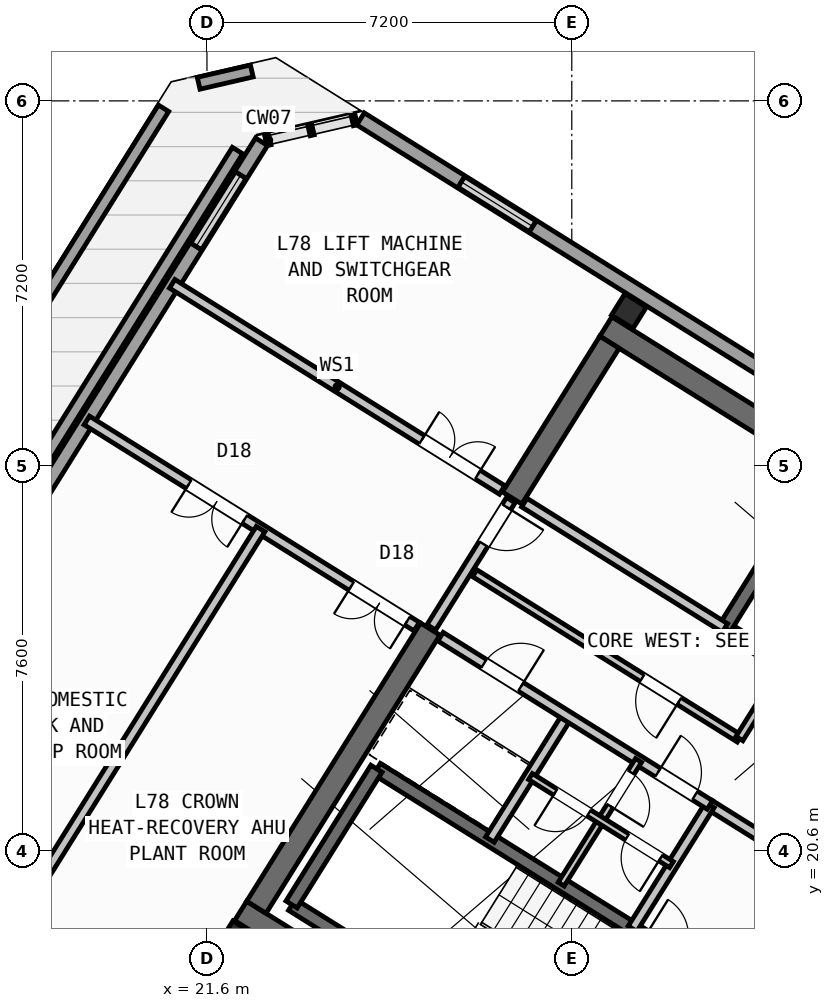
"""IFC4 building model, lengths in metres.
Left out: names, types, materials, properties, quantities, classifications, styles, units other than length and angle.
Written with IfcOpenShell. Run it as: python <this file> out.ifc"""

import sys

from ifc_helpers import new_model, si_unit, direction, frame, frame_2d, origin, origin_2d, place, context, subcontext, project, spatial, rectangle, hollow_rectangle, extrude, source, transform, mapped, element, fill, save


model = new_model("IFC4")
c1 = context("Model", 3, precision=1e-05, world=origin(), true_north=direction((0.0, 1.0)))
c2 = subcontext(c1, "Body", "Model", "MODEL_VIEW")
j1 = project(units=[si_unit("LENGTHUNIT", "METRE"), si_unit("PLANEANGLEUNIT", "RADIAN")], contexts=[c1])
p1 = place(None, origin())
s1 = spatial("IfcSite", under=j1, at=p1, CompositionType="ELEMENT")
p2 = place(p1, origin())
s2 = spatial("IfcBuilding", under=s1, at=p2, CompositionType="ELEMENT")
p3 = place(p2, frame((0.0, 0.0, 306.0)))
s3 = spatial("IfcBuildingStorey", under=s2, at=p3, CompositionType="ELEMENT", Elevation=306.0)
p4 = place(p3, frame((40.531, 24.036, 0.0), z_axis=(0.0, 0.0, 1.0), x_axis=(-0.848048787466, 0.529918157905, 0.0)))
e1 = element("IfcWall", 1, at=p4, inside=s3, PredefinedType="SHEAR", context=c2, shape_type="SweptSolid", body=[
    extrude(rectangle(XDim=13.04, YDim=0.45, at=frame_2d((6.52, 0.0))), origin(), (0.0, 0.0, 1.0), 3.32),
])
p5 = place(p3, frame((33.324, 12.503, 0.0), z_axis=(0.0, 0.0, 1.0), x_axis=(-0.848043529849, 0.529926571782, 0.0)))
e2 = element("IfcWall", 2, at=p5, inside=s3, PredefinedType="SHEAR", context=c2, shape_type="SweptSolid", body=[
    extrude(rectangle(XDim=13.04, YDim=0.45, at=frame_2d((6.52, 0.0))), origin(), (0.0, 0.0, 1.0), 3.32),
])
p6 = place(p3, frame((29.544, 30.636, 0.0), z_axis=(0.0, 0.0, 1.0), x_axis=(-0.529902075036, -0.848058836916, 0.0)))
e3 = element("IfcWall", 3, at=p6, inside=s3, PredefinedType="SHEAR", context=c2, shape_type="SweptSolid", body=[
    extrude(rectangle(XDim=3.625, YDim=0.45, at=frame_2d((1.812, 0.0))), origin(), (0.0, 0.0, 1.0), 3.32),
])
p7 = place(p3, frame((26.007, 24.976, 0.0), z_axis=(0.0, 0.0, 1.0), x_axis=(-0.529931155655, -0.848040665456, 0.0)))
e4 = element("IfcWall", 4, at=p7, inside=s3, PredefinedType="SHEAR", context=c2, shape_type="SweptSolid", body=[
    extrude(rectangle(XDim=6.475, YDim=0.45, at=frame_2d((3.238, 0.0))), origin(), (0.0, 0.0, 1.0), 3.32),
])
m1 = source(origin(), c2, "Body", "SweptSolid", [
    extrude(hollow_rectangle(XDim=0.5, YDim=0.5, WallThickness=0.025, at=origin_2d()), origin(), (0.0, 0.0, 1.0), 3.6),
])
for number, where, z_axis, x_axis in (
    (5, (29.928, 31.251, 0.0), (0.0, 0.0, 1.0), (-0.848, 0.53, 0.0)),
    (6, (22.191, 18.87, 0.0), (0.0, 0.0, 1.0), (-0.848, 0.53, 0.0)),
):
    element("IfcColumn", number, at=place(p3, frame(where, z_axis=z_axis, x_axis=x_axis)), inside=s3, PredefinedType="COLUMN", context=c2, shape_type="MappedRepresentation", body=[
        mapped(m1, transform((0.0, 0.0, 0.0), scale=1.0)),
    ])
p8 = place(p3, frame((12.129, 21.469, 0.0), z_axis=(0.0, 0.0, 1.0), x_axis=(0.529920637882, 0.848047237804, 0.0)))
e7 = element("IfcWall", 7, at=p8, inside=s3, PredefinedType="PARAPET", context=c2, shape_type="SweptSolid", body=[
    extrude(rectangle(XDim=16.256, YDim=0.24, at=frame_2d((8.128, 0.0))), origin(), (0.0, 0.0, 1.0), 1.15),
])
p9 = place(p3, frame((21.436, 35.748, 0.0), z_axis=(0.0, 0.0, 1.0), x_axis=(0.974395015602, 0.224842953123, 0.0)))
e8 = element("IfcWall", 8, at=p9, inside=s3, PredefinedType="PARAPET", context=c2, shape_type="SweptSolid", body=[
    extrude(rectangle(XDim=1.077, YDim=0.24, at=frame_2d((0.539, 0.0))), origin(), (0.0, 0.0, 1.0), 1.15),
])
p10 = place(p3, frame((22.203, 34.42, 0.0), z_axis=(0.0, 0.0, 1.0), x_axis=(-0.529922606747, -0.848046007513, 0.0)))
e9 = element("IfcWall", 9, at=p10, inside=s3, PredefinedType="PARAPET", context=c2, shape_type="SweptSolid", body=[
    extrude(rectangle(XDim=15.238, YDim=0.24, at=frame_2d((7.619, 0.0))), origin(), (0.0, 0.0, 1.0), 1.15),
])
p11 = place(p3, frame((30.731, 8.982, 0.0), z_axis=(0.0, 0.0, 1.0), x_axis=(-0.848046707212, 0.529921487002, 0.0)))
e10 = element("IfcWall", 10, at=p11, inside=s3, PredefinedType="STANDARD", context=c2, shape_type="SweptSolid", body=[
    extrude(rectangle(XDim=18.984, YDim=0.28, at=frame_2d((9.492, 0.0))), origin(), (0.0, 0.0, 1.0), 3.32),
])
p12 = place(p11, frame((7.283, 0.0, 0.85)))
e11 = element("IfcOpeningElement", 11, at=p12, cuts=e10, PredefinedType="OPENING", context=c2, shape_type="SweptSolid", body=[
    extrude(rectangle(XDim=1.7, YDim=1.6, at=frame_2d((0.85, 0.8))), frame((0.0, 0.15, 0.0), z_axis=(0.0, -1.0, 0.0), x_axis=(1.0, 0.0, 0.0)), (0.0, 0.0, 1.0), 0.3),
])
p13 = place(p3, frame((14.18, 20.996, 0.0), z_axis=(0.0, 0.0, 1.0), x_axis=(0.529922292894, 0.848046203632, 0.0)))
e12 = element("IfcWall", 12, at=p13, inside=s3, PredefinedType="STANDARD", context=c2, shape_type="SweptSolid", body=[
    extrude(rectangle(XDim=16.034, YDim=0.28, at=frame_2d((8.017, 0.0))), origin(), (0.0, 0.0, 1.0), 3.32),
])
p14 = place(p13, frame((3.871, 0.0, 0.85)))
e13 = element("IfcOpeningElement", 13, at=p14, cuts=e12, PredefinedType="OPENING", context=c2, shape_type="SweptSolid", body=[
    extrude(rectangle(XDim=1.7, YDim=1.6, at=frame_2d((0.85, 0.8))), frame((0.0, 0.15, 0.0), z_axis=(0.0, -1.0, 0.0), x_axis=(1.0, 0.0, 0.0)), (0.0, 0.0, 1.0), 0.3),
])
p15 = place(p13, frame((13.578, 0.0, 0.85)))
e14 = element("IfcOpeningElement", 14, at=p15, cuts=e12, PredefinedType="OPENING", context=c2, shape_type="SweptSolid", body=[
    extrude(rectangle(XDim=1.7, YDim=1.6, at=frame_2d((0.85, 0.8))), frame((0.0, 0.15, 0.0), z_axis=(0.0, -1.0, 0.0), x_axis=(1.0, 0.0, 0.0)), (0.0, 0.0, 1.0), 0.3),
])
p16 = place(p3, frame((24.631, 35.045, 0.0), z_axis=(0.0, 0.0, 1.0), x_axis=(0.848046707212, -0.529921487002, 0.0)))
e15 = element("IfcWall", 15, at=p16, inside=s3, PredefinedType="STANDARD", context=c2, shape_type="SweptSolid", body=[
    extrude(rectangle(XDim=18.984, YDim=0.28, at=frame_2d((9.492, 0.0))), origin(), (0.0, 0.0, 1.0), 3.32),
])
p17 = place(p16, frame((2.326, 0.0, 0.85)))
e16 = element("IfcOpeningElement", 16, at=p17, cuts=e15, PredefinedType="OPENING", context=c2, shape_type="SweptSolid", body=[
    extrude(rectangle(XDim=1.7, YDim=1.6, at=frame_2d((0.85, 0.8))), frame((0.0, 0.15, 0.0), z_axis=(0.0, -1.0, 0.0), x_axis=(1.0, 0.0, 0.0)), (0.0, 0.0, 1.0), 0.3),
])
p18 = place(p16, frame((11.968, 0.0, 0.85)))
e17 = element("IfcOpeningElement", 17, at=p18, cuts=e15, PredefinedType="OPENING", context=c2, shape_type="SweptSolid", body=[
    extrude(rectangle(XDim=1.7, YDim=1.6, at=frame_2d((0.85, 0.8))), frame((0.0, 0.15, 0.0), z_axis=(0.0, -1.0, 0.0), x_axis=(1.0, 0.0, 0.0)), (0.0, 0.0, 1.0), 0.3),
])
p19 = place(p3, frame((29.605, 15.581, 0.0), z_axis=(0.0, 0.0, 1.0), x_axis=(-0.848036911448, 0.529937163087, 0.0)))
e18 = element("IfcWall", 18, at=p19, inside=s3, PredefinedType="SHEAR", context=c2, shape_type="SweptSolid", body=[
    extrude(rectangle(XDim=7.46, YDim=0.26, at=frame_2d((3.73, 0.0))), origin(), (0.0, 0.0, 1.0), 3.32),
])
p20 = place(p3, frame((31.28, 18.261, 0.0), z_axis=(0.0, 0.0, 1.0), x_axis=(-0.848051618787, 0.529913626805, 0.0)))
e19 = element("IfcWall", 19, at=p20, inside=s3, PredefinedType="SHEAR", context=c2, shape_type="SweptSolid", body=[
    extrude(rectangle(XDim=7.46, YDim=0.26, at=frame_2d((3.73, 0.0))), origin(), (0.0, 0.0, 1.0), 3.32),
])
p21 = place(p20, frame((0.36, 0.0, 0.0)))
e20 = element("IfcOpeningElement", 20, at=p21, cuts=e19, PredefinedType="OPENING", context=c2, shape_type="SweptSolid", body=[
    extrude(rectangle(XDim=0.86, YDim=2.05, at=frame_2d((0.43, 1.025))), frame((0.0, 0.14, 0.0), z_axis=(0.0, -1.0, 0.0), x_axis=(1.0, 0.0, 0.0)), (0.0, 0.0, 1.0), 0.28),
])
p22 = place(p3, frame((24.945, 22.22, 0.0), z_axis=(0.0, 0.0, 1.0), x_axis=(-0.529908658664, -0.84805472316, 0.0)))
e21 = element("IfcWall", 21, at=p22, inside=s3, PredefinedType="SHEAR", context=c2, shape_type="SweptSolid", body=[
    extrude(rectangle(XDim=3.16, YDim=0.26, at=frame_2d((1.58, 0.0))), origin(), (0.0, 0.0, 1.0), 3.32),
])
p23 = place(p3, frame((38.046, 21.108, 0.0), z_axis=(0.0, 0.0, 1.0), x_axis=(-0.848054434086, 0.529909121291, 0.0)))
e22 = element("IfcWall", 22, at=p23, inside=s3, PredefinedType="SHEAR", context=c2, shape_type="SweptSolid", body=[
    extrude(rectangle(XDim=7.33, YDim=0.26, at=frame_2d((3.665, 0.0))), origin(), (0.0, 0.0, 1.0), 3.32),
])
p24 = place(p23, frame((0.22, 0.0, 0.0)))
e23 = element("IfcOpeningElement", 23, at=p24, cuts=e22, PredefinedType="OPENING", context=c2, shape_type="SweptSolid", body=[
    extrude(rectangle(XDim=1.1, YDim=2.1, at=frame_2d((0.55, 1.05))), frame((0.0, 0.14, 0.0), z_axis=(0.0, -1.0, 0.0), x_axis=(1.0, 0.0, 0.0)), (0.0, 0.0, 1.0), 0.28),
])
p25 = place(p3, frame((33.496, 27.677, 0.0), z_axis=(0.0, 0.0, 1.0), x_axis=(-0.529908658664, -0.84805472316, 0.0)))
e24 = element("IfcWall", 24, at=p25, inside=s3, PredefinedType="SHEAR", context=c2, shape_type="SweptSolid", body=[
    extrude(rectangle(XDim=3.16, YDim=0.26, at=frame_2d((1.58, 0.0))), origin(), (0.0, 0.0, 1.0), 3.32),
])
p26 = place(p3, frame((36.459, 18.421, 0.0), z_axis=(0.0, 0.0, 1.0), x_axis=(-0.848059591691, 0.529900867089, 0.0)))
e25 = element("IfcWall", 25, at=p26, inside=s3, PredefinedType="STANDARD", context=c2, shape_type="SweptSolid", body=[
    extrude(rectangle(XDim=5.818, YDim=0.2, at=frame_2d((2.909, 0.0))), origin(), (0.0, 0.0, 1.0), 3.31),
])
p27 = place(p26, frame((2.598, 0.0, 0.0)))
e26 = element("IfcOpeningElement", 26, at=p27, cuts=e25, PredefinedType="OPENING", context=c2, shape_type="SweptSolid", body=[
    extrude(rectangle(XDim=1.15, YDim=2.1, at=frame_2d((0.575, 1.05))), frame((0.0, 0.11, 0.0), z_axis=(0.0, -1.0, 0.0), x_axis=(1.0, 0.0, 0.0)), (0.0, 0.0, 1.0), 0.22),
])
p28 = place(p3, frame((31.822, 24.998, 0.0), z_axis=(0.0, 0.0, 1.0), x_axis=(-0.848054125777, 0.529909614701, 0.0)))
e27 = element("IfcWall", 27, at=p28, inside=s3, PredefinedType="STANDARD", context=c2, shape_type="SweptSolid", body=[
    extrude(rectangle(XDim=4.668, YDim=0.2, at=frame_2d((2.334, 0.0))), origin(), (0.0, 0.0, 1.0), 3.31),
])
p29 = place(p3, frame((32.108, 22.814, 0.0), z_axis=(0.0, 0.0, 1.0), x_axis=(-0.848047283855, 0.529920564185, 0.0)))
e28 = element("IfcWall", 28, at=p29, inside=s3, PredefinedType="PARTITIONING", context=c2, shape_type="SweptSolid", body=[
    extrude(rectangle(XDim=6.16, YDim=0.16, at=frame_2d((3.08, 0.0))), origin(), (0.0, 0.0, 1.0), 3.31),
])
p30 = place(p29, frame((1.4, 0.0, 0.0)))
e29 = element("IfcOpeningElement", 29, at=p30, cuts=e28, PredefinedType="OPENING", context=c2, shape_type="SweptSolid", body=[
    extrude(rectangle(XDim=0.86, YDim=2.05, at=frame_2d((0.43, 1.025))), frame((0.0, 0.09, 0.0), z_axis=(0.0, -1.0, 0.0), x_axis=(1.0, 0.0, 0.0)), (0.0, 0.0, 1.0), 0.18),
])
p31 = place(p3, frame((32.982, 24.213, 0.0), z_axis=(0.0, 0.0, 1.0), x_axis=(-0.529839334948, -0.84809803628, 0.0)))
e30 = element("IfcWall", 30, at=p31, inside=s3, PredefinedType="PARTITIONING", context=c2, shape_type="SweptSolid", body=[
    extrude(rectangle(XDim=1.65, YDim=0.16, at=frame_2d((0.825, 0.0))), origin(), (0.0, 0.0, 1.0), 3.31),
])
for number, where, z_axis, x_axis in (
    (31, (31.525, 21.504, 0.0), (0.0, 0.0, 1.0), (-0.53, -0.848, 0.0)),
    (32, (28.71, 23.263, 0.0), (0.0, 0.0, 1.0), (-0.53, -0.848, 0.0)),
):
    element("IfcWall", number, at=place(p3, frame(where, z_axis=z_axis, x_axis=x_axis)), inside=s3, PredefinedType="STANDARD", context=c2, shape_type="SweptSolid", body=[
        extrude(rectangle(XDim=2.88, YDim=0.2, at=frame_2d((1.44, 0.0))), origin(), (0.0, 0.0, 1.0), 3.31),
    ])
p32 = place(p3, frame((31.525, 21.504, 0.0), z_axis=(0.0, 0.0, 1.0), x_axis=(-0.848042066329, 0.529928913853, 0.0)))
e33 = element("IfcWall", 33, at=p32, inside=s3, PredefinedType="STANDARD", context=c2, shape_type="SweptSolid", body=[
    extrude(rectangle(XDim=6.268, YDim=0.2, at=frame_2d((3.134, 0.0))), origin(), (0.0, 0.0, 1.0), 3.31),
])
p33 = place(p32, frame((4.4, 0.0, 0.0)))
e34 = element("IfcOpeningElement", 34, at=p33, cuts=e33, PredefinedType="OPENING", context=c2, shape_type="SweptSolid", body=[
    extrude(rectangle(XDim=0.86, YDim=2.05, at=frame_2d((0.43, 1.025))), frame((0.0, 0.11, 0.0), z_axis=(0.0, -1.0, 0.0), x_axis=(1.0, 0.0, 0.0)), (0.0, 0.0, 1.0), 0.22),
])
p34 = place(p32, frame((0.35, 0.0, 0.0)))
e35 = element("IfcOpeningElement", 35, at=p34, cuts=e33, PredefinedType="OPENING", context=c2, shape_type="SweptSolid", body=[
    extrude(rectangle(XDim=0.86, YDim=2.05, at=frame_2d((0.43, 1.025))), frame((0.0, 0.11, 0.0), z_axis=(0.0, -1.0, 0.0), x_axis=(1.0, 0.0, 0.0)), (0.0, 0.0, 1.0), 0.22),
])
p35 = place(p3, frame((30.117, 22.384, 0.0), z_axis=(0.0, 0.0, 1.0), x_axis=(-0.529951914384, -0.848027693204, 0.0)))
e36 = element("IfcWall", 36, at=p35, inside=s3, PredefinedType="PLUMBINGWALL", context=c2, shape_type="SweptSolid", body=[
    extrude(rectangle(XDim=1.4, YDim=0.14, at=frame_2d((0.7, 0.0))), origin(), (0.0, 0.0, 1.0), 3.31),
])
p36 = place(p35, frame((0.28, 0.0, 0.0)))
e37 = element("IfcOpeningElement", 37, at=p36, cuts=e36, PredefinedType="OPENING", context=c2, shape_type="SweptSolid", body=[
    extrude(rectangle(XDim=0.78, YDim=2.05, at=frame_2d((0.39, 1.025))), frame((0.0, 0.08, 0.0), z_axis=(0.0, -1.0, 0.0), x_axis=(1.0, 0.0, 0.0)), (0.0, 0.0, 1.0), 0.16),
])
p37 = place(p3, frame((29.375, 21.196, 0.0), z_axis=(0.0, 0.0, 1.0), x_axis=(-0.529865479138, -0.848081702443, 0.0)))
e38 = element("IfcWall", 38, at=p37, inside=s3, PredefinedType="PLUMBINGWALL", context=c2, shape_type="SweptSolid", body=[
    extrude(rectangle(XDim=1.48, YDim=0.14, at=frame_2d((0.74, 0.0))), origin(), (0.0, 0.0, 1.0), 3.31),
])
p38 = place(p3, frame((30.766, 20.327, 0.0), z_axis=(0.0, 0.0, 1.0), x_axis=(-0.848052663127, 0.529911955482, 0.0)))
e39 = element("IfcWall", 39, at=p38, inside=s3, PredefinedType="PLUMBINGWALL", context=c2, shape_type="SweptSolid", body=[
    extrude(rectangle(XDim=3.28, YDim=0.14, at=frame_2d((1.64, 0.0))), origin(), (0.0, 0.0, 1.0), 3.31),
])
p39 = place(p38, frame((0.25, 0.0, 0.0)))
e40 = element("IfcOpeningElement", 40, at=p39, cuts=e39, PredefinedType="OPENING", context=c2, shape_type="SweptSolid", body=[
    extrude(rectangle(XDim=0.78, YDim=2.05, at=frame_2d((0.39, 1.025))), frame((0.0, 0.08, 0.0), z_axis=(0.0, -1.0, 0.0), x_axis=(1.0, 0.0, 0.0)), (0.0, 0.0, 1.0), 0.16),
])
p40 = place(p38, frame((1.92, 0.0, 0.0)))
e41 = element("IfcOpeningElement", 41, at=p40, cuts=e39, PredefinedType="OPENING", context=c2, shape_type="SweptSolid", body=[
    extrude(rectangle(XDim=0.78, YDim=2.05, at=frame_2d((0.39, 1.025))), frame((0.0, 0.08, 0.0), z_axis=(0.0, -1.0, 0.0), x_axis=(1.0, 0.0, 0.0)), (0.0, 0.0, 1.0), 0.16),
])
p41 = place(p3, frame((27.596, 27.52, 0.0), z_axis=(0.0, 0.0, 1.0), x_axis=(-0.529865479138, -0.848081702443, 0.0)))
e42 = element("IfcWall", 42, at=p41, inside=s3, PredefinedType="STANDARD", context=c2, shape_type="SweptSolid", body=[
    extrude(rectangle(XDim=2.96, YDim=0.2, at=frame_2d((1.48, 0.0))), origin(), (0.0, 0.0, 1.0), 3.31),
])
p42 = place(p41, frame((0.16, 0.0, 0.0)))
e43 = element("IfcOpeningElement", 43, at=p42, cuts=e42, PredefinedType="OPENING", context=c2, shape_type="SweptSolid", body=[
    extrude(rectangle(XDim=0.86, YDim=2.05, at=frame_2d((0.43, 1.025))), frame((0.0, 0.11, 0.0), z_axis=(0.0, -1.0, 0.0), x_axis=(1.0, 0.0, 0.0)), (0.0, 0.0, 1.0), 0.22),
])
p43 = place(p3, frame((25.74, 25.025, 0.0), z_axis=(0.0, 0.0, 1.0), x_axis=(-0.848051891756, 0.529913189956, 0.0)))
e44 = element("IfcWall", 44, at=p43, inside=s3, PredefinedType="STANDARD", context=c2, shape_type="SweptSolid", body=[
    extrude(rectangle(XDim=7.678, YDim=0.2, at=frame_2d((3.839, 0.0))), origin(), (0.0, 0.0, 1.0), 3.31),
])
p44 = place(p43, frame((0.218, 0.0, 0.0)))
e45 = element("IfcOpeningElement", 45, at=p44, cuts=e44, PredefinedType="OPENING", context=c2, shape_type="SweptSolid", body=[
    extrude(rectangle(XDim=1.3, YDim=2.15, at=frame_2d((0.65, 1.075))), frame((0.0, 0.11, 0.0), z_axis=(0.0, -1.0, 0.0), x_axis=(1.0, 0.0, 0.0)), (0.0, 0.0, 1.0), 0.22),
])
p45 = place(p43, frame((4.003, 0.0, 0.0)))
e46 = element("IfcOpeningElement", 46, at=p45, cuts=e44, PredefinedType="OPENING", context=c2, shape_type="SweptSolid", body=[
    extrude(rectangle(XDim=1.3, YDim=2.15, at=frame_2d((0.65, 1.075))), frame((0.0, 0.11, 0.0), z_axis=(0.0, -1.0, 0.0), x_axis=(1.0, 0.0, 0.0)), (0.0, 0.0, 1.0), 0.22),
])
p46 = place(p3, frame((22.659, 26.95, 0.0), z_axis=(0.0, 0.0, 1.0), x_axis=(-0.52992299529, -0.848045764722, 0.0)))
e47 = element("IfcWall", 47, at=p46, inside=s3, PredefinedType="STANDARD", context=c2, shape_type="SweptSolid", body=[
    extrude(rectangle(XDim=11.27, YDim=0.2, at=frame_2d((5.635, 0.0))), origin(), (0.0, 0.0, 1.0), 3.31),
])
p47 = place(p3, frame((27.425, 27.721, 0.0), z_axis=(0.0, 0.0, 1.0), x_axis=(-0.848060820519, 0.529898900452, 0.0)))
e48 = element("IfcWall", 48, at=p47, inside=s3, PredefinedType="STANDARD", context=c2, shape_type="SweptSolid", body=[
    extrude(rectangle(XDim=7.678, YDim=0.2, at=frame_2d((3.839, 0.0))), origin(), (0.0, 0.0, 1.0), 3.31),
])
p48 = place(p47, frame((0.568, 0.0, 0.0)))
e49 = element("IfcOpeningElement", 49, at=p48, cuts=e48, PredefinedType="OPENING", context=c2, shape_type="SweptSolid", body=[
    extrude(rectangle(XDim=1.3, YDim=2.15, at=frame_2d((0.65, 1.075))), frame((0.0, 0.11, 0.0), z_axis=(0.0, -1.0, 0.0), x_axis=(1.0, 0.0, 0.0)), (0.0, 0.0, 1.0), 0.22),
])
m2 = source(origin(), c2, "Body", "SweptSolid", [
    extrude(rectangle(XDim=1.7, YDim=1.6, at=frame_2d((0.85, 0.8))), frame((0.0, 0.03, 0.0), z_axis=(0.0, -1.0, 0.0), x_axis=(1.0, 0.0, 0.0)), (0.0, 0.0, 1.0), 0.06),
])
p49 = place(p15, origin())
e50 = element("IfcWindow", 50, at=p49, inside=s3, PartitioningType="SINGLE_PANEL", PredefinedType="WINDOW", context=c2, shape_type="MappedRepresentation", body=[
    mapped(m2, transform((0.0, 0.0, 0.0), scale=1.0)),
])
fill(e14, e50)
p50 = place(p17, origin())
e51 = element("IfcWindow", 51, at=p50, inside=s3, PartitioningType="SINGLE_PANEL", PredefinedType="WINDOW", context=c2, shape_type="MappedRepresentation", body=[
    mapped(m2, transform((0.0, 0.0, 0.0), scale=1.0)),
])
fill(e16, e51)
m3 = source(origin(), c2, "Body", "SweptSolid", [
    extrude(rectangle(XDim=0.86, YDim=2.05, at=frame_2d((0.43, 1.025))), frame((0.0, 0.025, 0.0), z_axis=(0.0, -1.0, 0.0), x_axis=(1.0, 0.0, 0.0)), (0.0, 0.0, 1.0), 0.05),
])
p51 = place(p30, origin())
e52 = element("IfcDoor", 52, at=p51, inside=s3, OperationType="SINGLE_SWING_LEFT", PredefinedType="DOOR", context=c2, shape_type="MappedRepresentation", body=[
    mapped(m3, transform((0.0, 0.0, 0.0), scale=1.0)),
])
fill(e29, e52)
p52 = place(p33, frame((0.86, 0.0, 0.0), z_axis=(0.0, 0.0, 1.0), x_axis=(-1.0, 0.0, 0.0)))
e53 = element("IfcDoor", 53, at=p52, inside=s3, OperationType="SINGLE_SWING_RIGHT", PredefinedType="DOOR", context=c2, shape_type="MappedRepresentation", body=[
    mapped(m3, transform((0.0, 0.0, 0.0), scale=1.0)),
])
fill(e34, e53)
p53 = place(p34, frame((0.86, 0.0, 0.0), z_axis=(0.0, 0.0, 1.0), x_axis=(-1.0, 0.0, 0.0)))
e54 = element("IfcDoor", 54, at=p53, inside=s3, OperationType="SINGLE_SWING_LEFT", PredefinedType="DOOR", context=c2, shape_type="MappedRepresentation", body=[
    mapped(m3, transform((0.0, 0.0, 0.0), scale=1.0)),
])
fill(e35, e54)
m4 = source(origin(), c2, "Body", "SweptSolid", [
    extrude(rectangle(XDim=0.78, YDim=2.05, at=frame_2d((0.39, 1.025))), frame((0.0, 0.025, 0.0), z_axis=(0.0, -1.0, 0.0), x_axis=(1.0, 0.0, 0.0)), (0.0, 0.0, 1.0), 0.05),
])
p54 = place(p36, origin())
e55 = element("IfcDoor", 55, at=p54, inside=s3, OperationType="SINGLE_SWING_RIGHT", PredefinedType="DOOR", context=c2, shape_type="MappedRepresentation", body=[
    mapped(m4, transform((0.0, 0.0, 0.0), scale=1.0)),
])
fill(e37, e55)
p55 = place(p39, origin())
e56 = element("IfcDoor", 56, at=p55, inside=s3, OperationType="SINGLE_SWING_LEFT", PredefinedType="DOOR", context=c2, shape_type="MappedRepresentation", body=[
    mapped(m4, transform((0.0, 0.0, 0.0), scale=1.0)),
])
fill(e40, e56)
p56 = place(p40, origin())
e57 = element("IfcDoor", 57, at=p56, inside=s3, OperationType="SINGLE_SWING_RIGHT", PredefinedType="DOOR", context=c2, shape_type="MappedRepresentation", body=[
    mapped(m4, transform((0.0, 0.0, 0.0), scale=1.0)),
])
fill(e41, e57)
p57 = place(p42, origin())
e58 = element("IfcDoor", 58, at=p57, inside=s3, OperationType="SINGLE_SWING_LEFT", PredefinedType="DOOR", context=c2, shape_type="MappedRepresentation", body=[
    mapped(m3, transform((0.0, 0.0, 0.0), scale=1.0)),
])
fill(e43, e58)
m5 = source(origin(), c2, "Body", "SweptSolid", [
    extrude(rectangle(XDim=1.3, YDim=2.15, at=frame_2d((0.65, 1.075))), frame((0.0, 0.025, 0.0), z_axis=(0.0, -1.0, 0.0), x_axis=(1.0, 0.0, 0.0)), (0.0, 0.0, 1.0), 0.05),
])
p58 = place(p44, origin())
e59 = element("IfcDoor", 59, at=p58, inside=s3, OperationType="DOUBLE_DOOR_SINGLE_SWING", PredefinedType="DOOR", context=c2, shape_type="MappedRepresentation", body=[
    mapped(m5, transform((0.0, 0.0, 0.0), scale=1.0)),
])
fill(e45, e59)
p59 = place(p45, origin())
e60 = element("IfcDoor", 60, at=p59, inside=s3, OperationType="DOUBLE_DOOR_SINGLE_SWING", PredefinedType="DOOR", context=c2, shape_type="MappedRepresentation", body=[
    mapped(m5, transform((0.0, 0.0, 0.0), scale=1.0)),
])
fill(e46, e60)
p60 = place(p48, frame((1.3, 0.0, 0.0), z_axis=(0.0, 0.0, 1.0), x_axis=(-1.0, 0.0, 0.0)))
e61 = element("IfcDoor", 61, at=p60, inside=s3, OperationType="DOUBLE_DOOR_SINGLE_SWING", PredefinedType="DOOR", context=c2, shape_type="MappedRepresentation", body=[
    mapped(m5, transform((0.0, 0.0, 0.0), scale=1.0)),
])
fill(e49, e61)
save(model, sys.argv[1])
